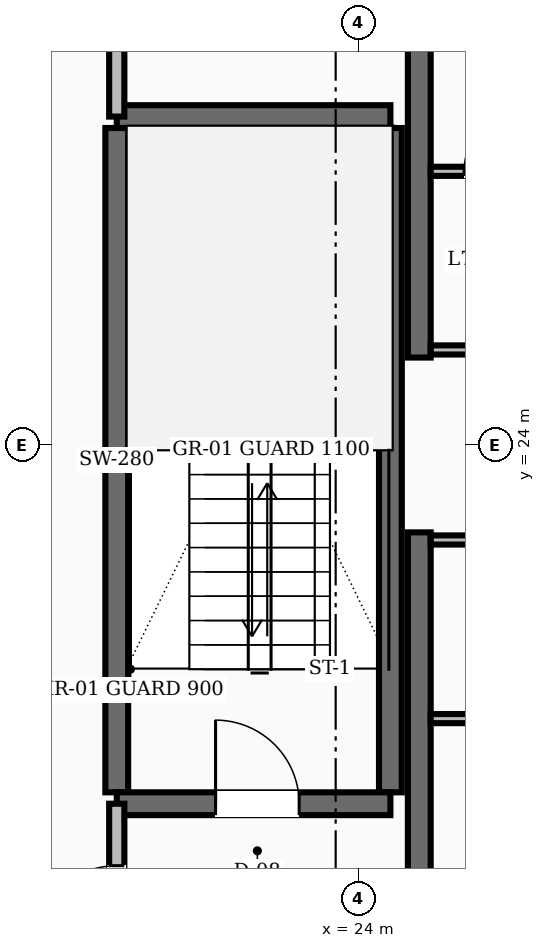
"""IFC4 building model, lengths in metres.
Left out: names, types, materials, properties, quantities, classifications, styles, units other than length and angle.
Written with IfcOpenShell. Run it as: python <this file> out.ifc"""

import sys

from ifc_helpers import new_model, si_unit, direction, frame, frame_2d, origin, place, context, subcontext, project, spatial, rectangle, extrude, element, fill, save


model = new_model("IFC4")
c1 = context("Model", 3, precision=1e-05, world=origin(), true_north=direction((0.0, 1.0)))
c2 = subcontext(c1, "Body", "Model", "MODEL_VIEW")
j1 = project(units=[si_unit("LENGTHUNIT", "METRE"), si_unit("PLANEANGLEUNIT", "RADIAN")], contexts=[c1])
p1 = place(None, origin())
s1 = spatial("IfcSite", under=j1, at=p1, CompositionType="ELEMENT")
p2 = place(p1, origin())
s2 = spatial("IfcBuilding", under=s1, at=p2, CompositionType="ELEMENT")
p3 = place(p2, frame((0.0, 0.0, 279.6)))
s3 = spatial("IfcBuildingStorey", under=s2, at=p3, CompositionType="ELEMENT", Elevation=279.6)
for number, where, z_axis, x_axis in (
    (1, (24.8, 16.55, 0.0), (0.0, 0.0, 1.0), (0.0, 1.0, 0.0)),
    (2, (24.8, 25.15, 0.0), (0.0, 0.0, 1.0), (0.0, 1.0, 0.0)),
):
    element("IfcWall", number, at=place(p3, frame(where, z_axis=z_axis, x_axis=x_axis)), inside=s3, PredefinedType="SHEAR", context=c2, shape_type="SweptSolid", body=[
        extrude(rectangle(XDim=6.3, YDim=0.3, at=frame_2d((3.15, 0.0))), origin(), (0.0, 0.0, 1.0), 3.6),
    ])
for number, where, z_axis, x_axis in (
    (3, (20.82, 19.43, 0.0), (0.0, 0.0, 1.0), (0.0, 1.0, 0.0)),
    (4, (24.42, 19.43, 0.0), (0.0, 0.0, 1.0), (0.0, 1.0, 0.0)),
):
    element("IfcWall", number, at=place(p3, frame(where, z_axis=z_axis, x_axis=x_axis)), inside=s3, PredefinedType="SHEAR", context=c2, shape_type="SweptSolid", body=[
        extrude(rectangle(XDim=8.74, YDim=0.3, at=frame_2d((4.37, 0.0))), origin(), (0.0, 0.0, 1.0), 3.6),
    ])
p4 = place(p3, frame((20.82, 19.28, 0.0), z_axis=(0.0, 0.0, 1.0), x_axis=(1.0, 0.0, 0.0)))
e5 = element("IfcWall", 5, at=p4, inside=s3, PredefinedType="SHEAR", context=c2, shape_type="SweptSolid", body=[
    extrude(rectangle(XDim=3.6, YDim=0.3, at=frame_2d((1.8, 0.0))), origin(), (0.0, 0.0, 1.0), 3.6),
])
p5 = place(p4, frame((1.3, 0.0, 0.0)))
e6 = element("IfcOpeningElement", 6, at=p5, cuts=e5, PredefinedType="OPENING", context=c2, shape_type="SweptSolid", body=[
    extrude(rectangle(XDim=1.1, YDim=2.1, at=frame_2d((0.55, 1.05))), frame((0.0, 0.16, 0.0), z_axis=(0.0, -1.0, 0.0), x_axis=(1.0, 0.0, 0.0)), (0.0, 0.0, 1.0), 0.32),
])
p6 = place(p3, frame((20.82, 28.32, 0.0), z_axis=(0.0, 0.0, 1.0), x_axis=(1.0, 0.0, 0.0)))
e7 = element("IfcWall", 7, at=p6, inside=s3, PredefinedType="SHEAR", context=c2, shape_type="SweptSolid", body=[
    extrude(rectangle(XDim=3.6, YDim=0.3, at=frame_2d((1.8, 0.0))), origin(), (0.0, 0.0, 1.0), 3.6),
])
p7 = place(p3, frame((20.82, 16.55, 0.0), z_axis=(0.0, 0.0, 1.0), x_axis=(0.0, 1.0, 0.0)))
e8 = element("IfcWall", 8, at=p7, inside=s3, PredefinedType="SOLIDWALL", context=c2, shape_type="SweptSolid", body=[
    extrude(rectangle(XDim=2.73, YDim=0.2, at=frame_2d((1.365, 0.0))), origin(), (0.0, 0.0, 1.0), 2.87),
])
p8 = place(p7, frame((0.815, 0.0, 0.0)))
e9 = element("IfcOpeningElement", 9, at=p8, cuts=e8, PredefinedType="OPENING", context=c2, shape_type="SweptSolid", body=[
    extrude(rectangle(XDim=1.1, YDim=2.1, at=frame_2d((0.55, 1.05))), frame((0.0, 0.11, 0.0), z_axis=(0.0, -1.0, 0.0), x_axis=(1.0, 0.0, 0.0)), (0.0, 0.0, 1.0), 0.22),
])
p9 = place(p3, frame((20.82, 28.32, 0.0), z_axis=(0.0, 0.0, 1.0), x_axis=(0.0, 1.0, 0.0)))
e10 = element("IfcWall", 10, at=p9, inside=s3, PredefinedType="SOLIDWALL", context=c2, shape_type="SweptSolid", body=[
    extrude(rectangle(XDim=3.13, YDim=0.2, at=frame_2d((1.565, 0.0))), origin(), (0.0, 0.0, 1.0), 2.87),
])
p10 = place(p9, frame((1.09, 0.0, 0.0)))
e11 = element("IfcOpeningElement", 11, at=p10, cuts=e10, PredefinedType="OPENING", context=c2, shape_type="SweptSolid", body=[
    extrude(rectangle(XDim=0.95, YDim=2.1, at=frame_2d((0.475, 1.05))), frame((0.0, 0.11, 0.0), z_axis=(0.0, -1.0, 0.0), x_axis=(1.0, 0.0, 0.0)), (0.0, 0.0, 1.0), 0.22),
])
p11 = place(p3, frame((24.95, 25.25, 0.0), z_axis=(0.0, 0.0, 1.0), x_axis=(1.0, 0.0, 0.0)))
e12 = element("IfcWall", 12, at=p11, inside=s3, PredefinedType="PARTITIONING", context=c2, shape_type="SweptSolid", body=[
    extrude(rectangle(XDim=3.2, YDim=0.12, at=frame_2d((1.6, 0.0))), origin(), (0.0, 0.0, 1.0), 2.87),
])
p12 = place(p11, frame((1.125, 0.0, 0.0)))
e13 = element("IfcOpeningElement", 13, at=p12, cuts=e12, PredefinedType="OPENING", context=c2, shape_type="SweptSolid", body=[
    extrude(rectangle(XDim=0.95, YDim=2.1, at=frame_2d((0.475, 1.05))), frame((0.0, 0.07, 0.0), z_axis=(0.0, -1.0, 0.0), x_axis=(1.0, 0.0, 0.0)), (0.0, 0.0, 1.0), 0.14),
])
p13 = place(p3, frame((24.95, 22.75, 0.0), z_axis=(0.0, 0.0, 1.0), x_axis=(1.0, 0.0, 0.0)))
e14 = element("IfcWall", 14, at=p13, inside=s3, PredefinedType="PARTITIONING", context=c2, shape_type="SweptSolid", body=[
    extrude(rectangle(XDim=3.2, YDim=0.12, at=frame_2d((1.6, 0.0))), origin(), (0.0, 0.0, 1.0), 2.87),
])
p14 = place(p13, frame((1.125, 0.0, 0.0)))
e15 = element("IfcOpeningElement", 15, at=p14, cuts=e14, PredefinedType="OPENING", context=c2, shape_type="SweptSolid", body=[
    extrude(rectangle(XDim=0.95, YDim=2.1, at=frame_2d((0.475, 1.05))), frame((0.0, 0.07, 0.0), z_axis=(0.0, -1.0, 0.0), x_axis=(1.0, 0.0, 0.0)), (0.0, 0.0, 1.0), 0.14),
])
p15 = place(p3, frame((24.95, 27.6, 0.0), z_axis=(0.0, 0.0, 1.0), x_axis=(1.0, 0.0, 0.0)))
e16 = element("IfcWall", 16, at=p15, inside=s3, PredefinedType="PARTITIONING", context=c2, shape_type="SweptSolid", body=[
    extrude(rectangle(XDim=3.2, YDim=0.12, at=frame_2d((1.6, 0.0))), origin(), (0.0, 0.0, 1.0), 2.87),
])
p16 = place(p15, frame((0.44, 0.0, 0.0)))
e17 = element("IfcOpeningElement", 17, at=p16, cuts=e16, PredefinedType="OPENING", context=c2, shape_type="SweptSolid", body=[
    extrude(rectangle(XDim=0.86, YDim=2.1, at=frame_2d((0.43, 1.05))), frame((0.0, 0.07, 0.0), z_axis=(0.0, -1.0, 0.0), x_axis=(1.0, 0.0, 0.0)), (0.0, 0.0, 1.0), 0.14),
])
p17 = place(p15, frame((1.9, 0.0, 0.0)))
e18 = element("IfcOpeningElement", 18, at=p17, cuts=e16, PredefinedType="OPENING", context=c2, shape_type="SweptSolid", body=[
    extrude(rectangle(XDim=0.86, YDim=2.1, at=frame_2d((0.43, 1.05))), frame((0.0, 0.07, 0.0), z_axis=(0.0, -1.0, 0.0), x_axis=(1.0, 0.0, 0.0)), (0.0, 0.0, 1.0), 0.14),
])
p18 = place(p3, frame((24.95, 20.4, 0.0), z_axis=(0.0, 0.0, 1.0), x_axis=(1.0, 0.0, 0.0)))
e19 = element("IfcWall", 19, at=p18, inside=s3, PredefinedType="PARTITIONING", context=c2, shape_type="SweptSolid", body=[
    extrude(rectangle(XDim=3.2, YDim=0.12, at=frame_2d((1.6, 0.0))), origin(), (0.0, 0.0, 1.0), 2.87),
])
p19 = place(p18, frame((1.125, 0.0, 0.0)))
e20 = element("IfcOpeningElement", 20, at=p19, cuts=e19, PredefinedType="OPENING", context=c2, shape_type="SweptSolid", body=[
    extrude(rectangle(XDim=0.95, YDim=2.1, at=frame_2d((0.475, 1.05))), frame((0.0, 0.07, 0.0), z_axis=(0.0, -1.0, 0.0), x_axis=(1.0, 0.0, 0.0)), (0.0, 0.0, 1.0), 0.14),
])
p20 = place(p5, origin())
e21 = element("IfcDoor", 21, at=p20, inside=s3, OperationType="SINGLE_SWING_LEFT", PredefinedType="DOOR", context=c2, shape_type="SweptSolid", body=[
    extrude(rectangle(XDim=1.1, YDim=2.1, at=frame_2d((0.55, 1.05))), frame((0.0, 0.025, 0.0), z_axis=(0.0, -1.0, 0.0), x_axis=(1.0, 0.0, 0.0)), (0.0, 0.0, 1.0), 0.05),
])
fill(e6, e21)
p21 = place(p8, origin())
e22 = element("IfcDoor", 22, at=p21, inside=s3, OperationType="SINGLE_SWING_LEFT", PredefinedType="DOOR", context=c2, shape_type="SweptSolid", body=[
    extrude(rectangle(XDim=1.1, YDim=2.1, at=frame_2d((0.55, 1.05))), frame((0.0, 0.025, 0.0), z_axis=(0.0, -1.0, 0.0), x_axis=(1.0, 0.0, 0.0)), (0.0, 0.0, 1.0), 0.05),
])
fill(e9, e22)
p22 = place(p16, origin())
e23 = element("IfcDoor", 23, at=p22, inside=s3, OperationType="SINGLE_SWING_RIGHT", PredefinedType="DOOR", context=c2, shape_type="SweptSolid", body=[
    extrude(rectangle(XDim=0.86, YDim=2.1, at=frame_2d((0.43, 1.05))), frame((0.0, 0.025, 0.0), z_axis=(0.0, -1.0, 0.0), x_axis=(1.0, 0.0, 0.0)), (0.0, 0.0, 1.0), 0.05),
])
fill(e17, e23)
save(model, sys.argv[1])
